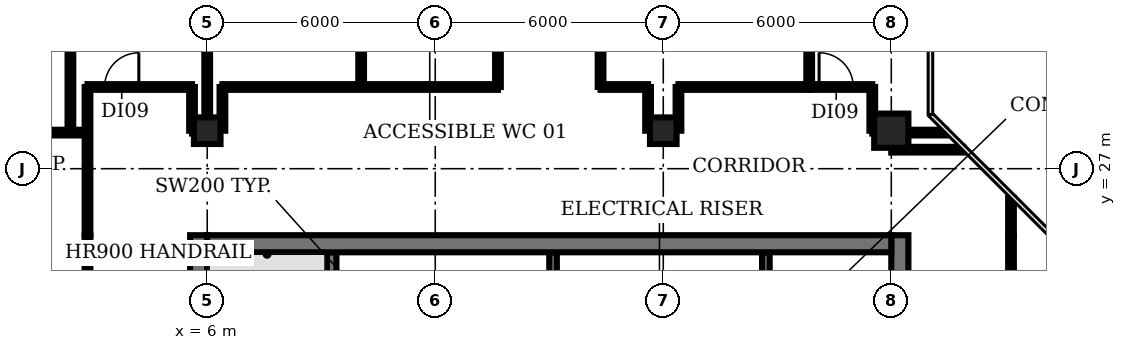
"""IFC4 building model, lengths in metres.
Left out: names, types, materials, properties, quantities, classifications, styles, units other than length and angle.
Written with IfcOpenShell. Run it as: python <this file> out.ifc"""

import sys

from ifc_helpers import new_model, si_unit, direction, frame, frame_2d, origin, origin_2d, place, context, subcontext, project, spatial, rectangle, circle, extrude, element, fill, save


model = new_model("IFC4")
c1 = context("Model", 3, precision=1e-05, world=origin(), true_north=direction((0.0, 1.0)))
c2 = subcontext(c1, "Body", "Model", "MODEL_VIEW")
j1 = project(units=[si_unit("LENGTHUNIT", "METRE"), si_unit("PLANEANGLEUNIT", "RADIAN")], contexts=[c1])
p1 = place(None, origin())
s1 = spatial("IfcSite", under=j1, at=p1, CompositionType="ELEMENT")
p2 = place(p1, origin())
s2 = spatial("IfcBuilding", under=s1, at=p2, CompositionType="ELEMENT")
p3 = place(p2, frame((0.0, 0.0, 230.6)))
s3 = spatial("IfcBuildingStorey", under=s2, at=p3, CompositionType="ELEMENT", Elevation=230.6)
for number, where, z_axis, x_axis in (
    (1, (6.0, 28.0, 0.0), (0.0, 0.0, 1.0), (1.0, 0.0, 0.0)),
    (2, (18.0, 28.0, 0.0), (0.0, 0.0, 1.0), (1.0, 0.0, 0.0)),
):
    element("IfcColumn", number, at=place(p3, frame(where, z_axis=z_axis, x_axis=x_axis)), inside=s3, PredefinedType="COLUMN", context=c2, shape_type="SweptSolid", body=[
        extrude(rectangle(XDim=0.7, YDim=0.7, at=origin_2d()), origin(), (0.0, 0.0, 1.0), 3.85),
    ])
p4 = place(p3, frame((24.0, 28.0, 0.0), z_axis=(0.0, 0.0, 1.0), x_axis=(1.0, 0.0, 0.0)))
e3 = element("IfcColumn", 3, at=p4, inside=s3, PredefinedType="COLUMN", context=c2, shape_type="SweptSolid", body=[
    extrude(circle(Radius=0.45, at=origin_2d()), origin(), (0.0, 0.0, 1.0), 3.85),
])
p5 = place(p3, frame((9.275, 18.375, 0.0), z_axis=(0.0, 0.0, 1.0), x_axis=(0.0, 1.0, 0.0)))
e4 = element("IfcWall", 4, at=p5, inside=s3, PredefinedType="SHEAR", context=c2, shape_type="SweptSolid", body=[
    extrude(rectangle(XDim=6.425, YDim=0.25, at=frame_2d((3.212, 0.0))), origin(), (0.0, 0.0, 1.0), 3.85),
])
for number, where, z_axis, x_axis in (
    (5, (15.1, 22.9, 0.0), (0.0, 0.0, 1.0), (0.0, 1.0, 0.0)),
    (6, (20.7, 22.9, 0.0), (0.0, 0.0, 1.0), (0.0, 1.0, 0.0)),
):
    element("IfcWall", number, at=place(p3, frame(where, z_axis=z_axis, x_axis=x_axis)), inside=s3, PredefinedType="SHEAR", context=c2, shape_type="SweptSolid", body=[
        extrude(rectangle(XDim=1.9, YDim=0.2, at=frame_2d((0.95, 0.0))), origin(), (0.0, 0.0, 1.0), 3.85),
    ])
p6 = place(p3, frame((5.775, 4.42, 0.0), z_axis=(0.0, 0.0, 1.0), x_axis=(0.0, 1.0, 0.0)))
e7 = element("IfcWall", 7, at=p6, inside=s3, PredefinedType="SHEAR", context=c2, shape_type="SweptSolid", body=[
    extrude(rectangle(XDim=20.83, YDim=0.45, at=frame_2d((10.415, 0.0))), origin(), (0.0, 0.0, 1.0), 3.85),
])
p7 = place(p6, frame((1.23, 0.0, 0.0)))
e8 = element("IfcOpeningElement", 8, at=p7, cuts=e7, PredefinedType="OPENING", context=c2, shape_type="SweptSolid", body=[
    extrude(rectangle(XDim=1.5, YDim=2.1, at=frame_2d((0.75, 1.05))), frame((0.0, 0.235, 0.0), z_axis=(0.0, -1.0, 0.0), x_axis=(1.0, 0.0, 0.0)), (0.0, 0.0, 1.0), 0.47),
])
p8 = place(p6, frame((7.68, 0.0, 0.0)))
e9 = element("IfcOpeningElement", 9, at=p8, cuts=e7, PredefinedType="OPENING", context=c2, shape_type="SweptSolid", body=[
    extrude(rectangle(XDim=1.2, YDim=2.1, at=frame_2d((0.6, 1.05))), frame((0.0, 0.235, 0.0), z_axis=(0.0, -1.0, 0.0), x_axis=(1.0, 0.0, 0.0)), (0.0, 0.0, 1.0), 0.47),
])
p9 = place(p6, frame((14.23, 0.0, 0.0)))
e10 = element("IfcOpeningElement", 10, at=p9, cuts=e7, PredefinedType="OPENING", context=c2, shape_type="SweptSolid", body=[
    extrude(rectangle(XDim=1.2, YDim=2.1, at=frame_2d((0.6, 1.05))), frame((0.0, 0.235, 0.0), z_axis=(0.0, -1.0, 0.0), x_axis=(1.0, 0.0, 0.0)), (0.0, 0.0, 1.0), 0.47),
])
p10 = place(p3, frame((24.225, 25.25, 0.0), z_axis=(0.0, 0.0, 1.0), x_axis=(0.0, -1.0, 0.0)))
e11 = element("IfcWall", 11, at=p10, inside=s3, PredefinedType="SHEAR", context=c2, shape_type="SweptSolid", body=[
    extrude(rectangle(XDim=20.83, YDim=0.45, at=frame_2d((10.415, 0.0))), origin(), (0.0, 0.0, 1.0), 3.85),
])
p11 = place(p10, frame((18.1, 0.0, 0.0)))
e12 = element("IfcOpeningElement", 12, at=p11, cuts=e11, PredefinedType="OPENING", context=c2, shape_type="SweptSolid", body=[
    extrude(rectangle(XDim=1.5, YDim=2.1, at=frame_2d((0.75, 1.05))), frame((0.0, 0.235, 0.0), z_axis=(0.0, -1.0, 0.0), x_axis=(1.0, 0.0, 0.0)), (0.0, 0.0, 1.0), 0.47),
])
p12 = place(p10, frame((12.0, 0.0, 0.0)))
e13 = element("IfcOpeningElement", 13, at=p12, cuts=e11, PredefinedType="OPENING", context=c2, shape_type="SweptSolid", body=[
    extrude(rectangle(XDim=0.9, YDim=2.1, at=frame_2d((0.45, 1.05))), frame((0.0, 0.235, 0.0), z_axis=(0.0, -1.0, 0.0), x_axis=(1.0, 0.0, 0.0)), (0.0, 0.0, 1.0), 0.47),
])
p13 = place(p10, frame((6.0, 0.0, 0.0)))
e14 = element("IfcOpeningElement", 14, at=p13, cuts=e11, PredefinedType="OPENING", context=c2, shape_type="SweptSolid", body=[
    extrude(rectangle(XDim=2.0, YDim=2.1, at=frame_2d((1.0, 1.05))), frame((0.0, 0.235, 0.0), z_axis=(0.0, -1.0, 0.0), x_axis=(1.0, 0.0, 0.0)), (0.0, 0.0, 1.0), 0.47),
])
p14 = place(p3, frame((6.0, 25.025, 0.0), z_axis=(0.0, 0.0, 1.0), x_axis=(1.0, 0.0, 0.0)))
e15 = element("IfcWall", 15, at=p14, inside=s3, PredefinedType="SHEAR", context=c2, shape_type="SweptSolid", body=[
    extrude(rectangle(XDim=18.0, YDim=0.45, at=frame_2d((9.0, 0.0))), origin(), (0.0, 0.0, 1.0), 3.85),
])
p15 = place(p3, frame((-1.05, 27.95, 0.0), z_axis=(0.0, 0.0, 1.0), x_axis=(1.0, 0.0, 0.0)))
e16 = element("IfcWall", 16, at=p15, inside=s3, PredefinedType="PARTITIONING", context=c2, shape_type="SweptSolid", body=[
    extrude(rectangle(XDim=3.9, YDim=0.15, at=frame_2d((1.95, 0.0))), origin(), (0.0, 0.0, 1.0), 2.88),
])
p16 = place(p3, frame((2.4, 27.95, 0.0), z_axis=(0.0, 0.0, 1.0), x_axis=(0.0, 1.0, 0.0)))
e17 = element("IfcWall", 17, at=p16, inside=s3, PredefinedType="PARTITIONING", context=c2, shape_type="SweptSolid", body=[
    extrude(rectangle(XDim=6.0, YDim=0.15, at=frame_2d((3.0, 0.0))), origin(), (0.0, 0.0, 1.0), 2.88),
])
p17 = place(p3, frame((2.85, 5.59, 0.0), z_axis=(0.0, 0.0, 1.0), x_axis=(0.0, 1.0, 0.0)))
e18 = element("IfcWall", 18, at=p17, inside=s3, PredefinedType="PARTITIONING", context=c2, shape_type="SweptSolid", body=[
    extrude(rectangle(XDim=19.66, YDim=0.15, at=frame_2d((9.83, 0.0))), origin(), (0.0, 0.0, 1.0), 2.88),
])
p18 = place(p17, frame((8.66, 0.0, 0.0)))
e19 = element("IfcOpeningElement", 19, at=p18, cuts=e18, PredefinedType="OPENING", context=c2, shape_type="SweptSolid", body=[
    extrude(rectangle(XDim=1.2, YDim=2.1, at=frame_2d((0.6, 1.05))), frame((0.0, 0.085, 0.0), z_axis=(0.0, -1.0, 0.0), x_axis=(1.0, 0.0, 0.0)), (0.0, 0.0, 1.0), 0.17),
])
p19 = place(p3, frame((2.85, 25.25, 0.0), z_axis=(0.0, 0.0, 1.0), x_axis=(0.0, 1.0, 0.0)))
e20 = element("IfcWall", 20, at=p19, inside=s3, PredefinedType="PARTITIONING", context=c2, shape_type="SweptSolid", body=[
    extrude(rectangle(XDim=3.9, YDim=0.15, at=frame_2d((1.95, 0.0))), origin(), (0.0, 0.0, 1.0), 2.88),
])
p20 = place(p3, frame((2.85, 29.15, 0.0), z_axis=(0.0, 0.0, 1.0), x_axis=(1.0, 0.0, 0.0)))
e21 = element("IfcWall", 21, at=p20, inside=s3, PredefinedType="PARTITIONING", context=c2, shape_type="SweptSolid", body=[
    extrude(rectangle(XDim=2.75, YDim=0.15, at=frame_2d((1.375, 0.0))), origin(), (0.0, 0.0, 1.0), 2.88),
])
p21 = place(p20, frame((0.45, 0.0, 0.0)))
e22 = element("IfcOpeningElement", 22, at=p21, cuts=e21, PredefinedType="OPENING", context=c2, shape_type="SweptSolid", body=[
    extrude(rectangle(XDim=0.9, YDim=2.1, at=frame_2d((0.45, 1.05))), frame((0.0, 0.085, 0.0), z_axis=(0.0, -1.0, 0.0), x_axis=(1.0, 0.0, 0.0)), (0.0, 0.0, 1.0), 0.17),
])
p22 = place(p3, frame((5.6, 28.0, 0.0), z_axis=(0.0, 0.0, 1.0), x_axis=(0.0, 1.0, 0.0)))
e23 = element("IfcWall", 23, at=p22, inside=s3, PredefinedType="PARTITIONING", context=c2, shape_type="SweptSolid", body=[
    extrude(rectangle(XDim=1.15, YDim=0.15, at=frame_2d((0.575, 0.0))), origin(), (0.0, 0.0, 1.0), 2.88),
])
p23 = place(p3, frame((5.6, 28.0, 0.0), z_axis=(0.0, 0.0, 1.0), x_axis=(1.0, 0.0, 0.0)))
e24 = element("IfcWall", 24, at=p23, inside=s3, PredefinedType="PARTITIONING", context=c2, shape_type="SweptSolid", body=[
    extrude(rectangle(XDim=0.4, YDim=0.15, at=frame_2d((0.2, 0.0))), origin(), (0.0, 0.0, 1.0), 2.88),
])
p24 = place(p3, frame((6.0, 28.0, 0.0), z_axis=(0.0, 0.0, 1.0), x_axis=(0.0, 1.0, 0.0)))
e25 = element("IfcWall", 25, at=p24, inside=s3, PredefinedType="PARTITIONING", context=c2, shape_type="SweptSolid", body=[
    extrude(rectangle(XDim=5.95, YDim=0.15, at=frame_2d((2.975, 0.0))), origin(), (0.0, 0.0, 1.0), 2.88),
])
p25 = place(p3, frame((6.4, 28.0, 0.0), z_axis=(0.0, 0.0, 1.0), x_axis=(0.0, 1.0, 0.0)))
e26 = element("IfcWall", 26, at=p25, inside=s3, PredefinedType="PARTITIONING", context=c2, shape_type="SweptSolid", body=[
    extrude(rectangle(XDim=1.15, YDim=0.15, at=frame_2d((0.575, 0.0))), origin(), (0.0, 0.0, 1.0), 2.88),
])
p26 = place(p3, frame((6.4, 29.15, 0.0), z_axis=(0.0, 0.0, 1.0), x_axis=(1.0, 0.0, 0.0)))
e27 = element("IfcWall", 27, at=p26, inside=s3, PredefinedType="PARTITIONING", context=c2, shape_type="SweptSolid", body=[
    extrude(rectangle(XDim=7.25, YDim=0.15, at=frame_2d((3.625, 0.0))), origin(), (0.0, 0.0, 1.0), 2.88),
])
p27 = place(p3, frame((10.05, 29.15, 0.0), z_axis=(0.0, 0.0, 1.0), x_axis=(0.0, 1.0, 0.0)))
e28 = element("IfcWall", 28, at=p27, inside=s3, PredefinedType="PARTITIONING", context=c2, shape_type="SweptSolid", body=[
    extrude(rectangle(XDim=4.8, YDim=0.15, at=frame_2d((2.4, 0.0))), origin(), (0.0, 0.0, 1.0), 2.88),
])
p28 = place(p3, frame((13.65, 29.15, 0.0), z_axis=(0.0, 0.0, 1.0), x_axis=(0.0, 1.0, 0.0)))
e29 = element("IfcWall", 29, at=p28, inside=s3, PredefinedType="PARTITIONING", context=c2, shape_type="SweptSolid", body=[
    extrude(rectangle(XDim=4.8, YDim=0.15, at=frame_2d((2.4, 0.0))), origin(), (0.0, 0.0, 1.0), 2.88),
])
p29 = place(p28, frame((1.6, 0.0, 0.0)))
e30 = element("IfcOpeningElement", 30, at=p29, cuts=e29, PredefinedType="OPENING", context=c2, shape_type="SweptSolid", body=[
    extrude(rectangle(XDim=0.9, YDim=2.1, at=frame_2d((0.45, 1.05))), frame((0.0, 0.085, 0.0), z_axis=(0.0, -1.0, 0.0), x_axis=(1.0, 0.0, 0.0)), (0.0, 0.0, 1.0), 0.17),
])
p30 = place(p3, frame((16.35, 29.15, 0.0), z_axis=(0.0, 0.0, 1.0), x_axis=(0.0, 1.0, 0.0)))
e31 = element("IfcWall", 31, at=p30, inside=s3, PredefinedType="PARTITIONING", context=c2, shape_type="SweptSolid", body=[
    extrude(rectangle(XDim=4.8, YDim=0.15, at=frame_2d((2.4, 0.0))), origin(), (0.0, 0.0, 1.0), 2.88),
])
p31 = place(p3, frame((16.35, 29.15, 0.0), z_axis=(0.0, 0.0, 1.0), x_axis=(1.0, 0.0, 0.0)))
e32 = element("IfcWall", 32, at=p31, inside=s3, PredefinedType="PARTITIONING", context=c2, shape_type="SweptSolid", body=[
    extrude(rectangle(XDim=1.25, YDim=0.15, at=frame_2d((0.625, 0.0))), origin(), (0.0, 0.0, 1.0), 2.88),
])
for number, where, z_axis, x_axis in (
    (33, (17.6, 28.0, 0.0), (0.0, 0.0, 1.0), (0.0, 1.0, 0.0)),
    (34, (18.4, 28.0, 0.0), (0.0, 0.0, 1.0), (0.0, 1.0, 0.0)),
):
    element("IfcWall", number, at=place(p3, frame(where, z_axis=z_axis, x_axis=x_axis)), inside=s3, PredefinedType="PARTITIONING", context=c2, shape_type="SweptSolid", body=[
        extrude(rectangle(XDim=1.15, YDim=0.15, at=frame_2d((0.575, 0.0))), origin(), (0.0, 0.0, 1.0), 2.88),
    ])
p32 = place(p3, frame((18.4, 29.15, 0.0), z_axis=(0.0, 0.0, 1.0), x_axis=(1.0, 0.0, 0.0)))
e35 = element("IfcWall", 35, at=p32, inside=s3, PredefinedType="PARTITIONING", context=c2, shape_type="SweptSolid", body=[
    extrude(rectangle(XDim=3.44, YDim=0.15, at=frame_2d((1.72, 0.0))), origin(), (0.0, 0.0, 1.0), 2.88),
])
p33 = place(p3, frame((21.84, 29.15, 0.0), z_axis=(0.0, 0.0, 1.0), x_axis=(0.0, 1.0, 0.0)))
e36 = element("IfcWall", 36, at=p33, inside=s3, PredefinedType="PARTITIONING", context=c2, shape_type="SweptSolid", body=[
    extrude(rectangle(XDim=4.8, YDim=0.15, at=frame_2d((2.4, 0.0))), origin(), (0.0, 0.0, 1.0), 2.88),
])
p34 = place(p3, frame((21.84, 29.15, 0.0), z_axis=(0.0, 0.0, 1.0), x_axis=(1.0, 0.0, 0.0)))
e37 = element("IfcWall", 37, at=p34, inside=s3, PredefinedType="PARTITIONING", context=c2, shape_type="SweptSolid", body=[
    extrude(rectangle(XDim=1.66, YDim=0.15, at=frame_2d((0.83, 0.0))), origin(), (0.0, 0.0, 1.0), 2.88),
])
p35 = place(p34, frame((0.26, 0.0, 0.0)))
e38 = element("IfcOpeningElement", 38, at=p35, cuts=e37, PredefinedType="OPENING", context=c2, shape_type="SweptSolid", body=[
    extrude(rectangle(XDim=0.9, YDim=2.1, at=frame_2d((0.45, 1.05))), frame((0.0, 0.085, 0.0), z_axis=(0.0, -1.0, 0.0), x_axis=(1.0, 0.0, 0.0)), (0.0, 0.0, 1.0), 0.17),
])
p36 = place(p3, frame((23.5, 28.0, 0.0), z_axis=(0.0, 0.0, 1.0), x_axis=(0.0, 1.0, 0.0)))
e39 = element("IfcWall", 39, at=p36, inside=s3, PredefinedType="PARTITIONING", context=c2, shape_type="SweptSolid", body=[
    extrude(rectangle(XDim=1.15, YDim=0.15, at=frame_2d((0.575, 0.0))), origin(), (0.0, 0.0, 1.0), 2.88),
])
p37 = place(p3, frame((23.5, 28.0, 0.0), z_axis=(0.0, 0.0, 1.0), x_axis=(1.0, 0.0, 0.0)))
e40 = element("IfcWall", 40, at=p37, inside=s3, PredefinedType="PARTITIONING", context=c2, shape_type="SweptSolid", body=[
    extrude(rectangle(XDim=0.5, YDim=0.15, at=frame_2d((0.25, 0.0))), origin(), (0.0, 0.0, 1.0), 2.88),
])
p38 = place(p3, frame((24.0, 27.5, 0.0), z_axis=(0.0, 0.0, 1.0), x_axis=(1.0, 0.0, 0.0)))
e41 = element("IfcWall", 41, at=p38, inside=s3, PredefinedType="PARTITIONING", context=c2, shape_type="SweptSolid", body=[
    extrude(rectangle(XDim=1.89, YDim=0.15, at=frame_2d((0.945, 0.0))), origin(), (0.0, 0.0, 1.0), 2.88),
])
p39 = place(p3, frame((24.0, 27.95, 0.0), z_axis=(0.0, 0.0, 1.0), x_axis=(1.0, 0.0, 0.0)))
e42 = element("IfcWall", 42, at=p39, inside=s3, PredefinedType="PARTITIONING", context=c2, shape_type="SweptSolid", body=[
    extrude(rectangle(XDim=1.44, YDim=0.15, at=frame_2d((0.72, 0.0))), origin(), (0.0, 0.0, 1.0), 2.88),
])
p40 = place(p3, frame((27.15, 25.25, 0.0), z_axis=(0.0, 0.0, 1.0), x_axis=(0.0, -1.0, 0.0)))
e43 = element("IfcWall", 43, at=p40, inside=s3, PredefinedType="PARTITIONING", context=c2, shape_type="SweptSolid", body=[
    extrude(rectangle(XDim=5.85, YDim=0.15, at=frame_2d((2.925, 0.0))), origin(), (0.0, 0.0, 1.0), 2.88),
])
p41 = place(p40, frame((1.65, 0.0, 0.0)))
e44 = element("IfcOpeningElement", 44, at=p41, cuts=e43, PredefinedType="OPENING", context=c2, shape_type="SweptSolid", body=[
    extrude(rectangle(XDim=1.0, YDim=2.1, at=frame_2d((0.5, 1.05))), frame((0.0, 0.085, 0.0), z_axis=(0.0, -1.0, 0.0), x_axis=(1.0, 0.0, 0.0)), (0.0, 0.0, 1.0), 0.17),
])
p42 = place(p3, frame((27.15, 25.25, 0.0), z_axis=(0.0, 0.0, 1.0), x_axis=(0.0, 1.0, 0.0)))
e45 = element("IfcWall", 45, at=p42, inside=s3, PredefinedType="PARTITIONING", context=c2, shape_type="SweptSolid", body=[
    extrude(rectangle(XDim=0.98, YDim=0.15, at=frame_2d((0.49, 0.0))), origin(), (0.0, 0.0, 1.0), 2.88),
])
p43 = place(p21, origin())
e46 = element("IfcDoor", 46, at=p43, inside=s3, OperationType="SINGLE_SWING_RIGHT", PredefinedType="DOOR", context=c2, shape_type="SweptSolid", body=[
    extrude(rectangle(XDim=0.9, YDim=2.1, at=frame_2d((0.45, 1.05))), frame((0.0, 0.025, 0.0), z_axis=(0.0, -1.0, 0.0), x_axis=(1.0, 0.0, 0.0)), (0.0, 0.0, 1.0), 0.05),
])
fill(e22, e46)
p44 = place(p35, origin())
e47 = element("IfcDoor", 47, at=p44, inside=s3, OperationType="SINGLE_SWING_LEFT", PredefinedType="DOOR", context=c2, shape_type="SweptSolid", body=[
    extrude(rectangle(XDim=0.9, YDim=2.1, at=frame_2d((0.45, 1.05))), frame((0.0, 0.025, 0.0), z_axis=(0.0, -1.0, 0.0), x_axis=(1.0, 0.0, 0.0)), (0.0, 0.0, 1.0), 0.05),
])
fill(e38, e47)
save(model, sys.argv[1])
